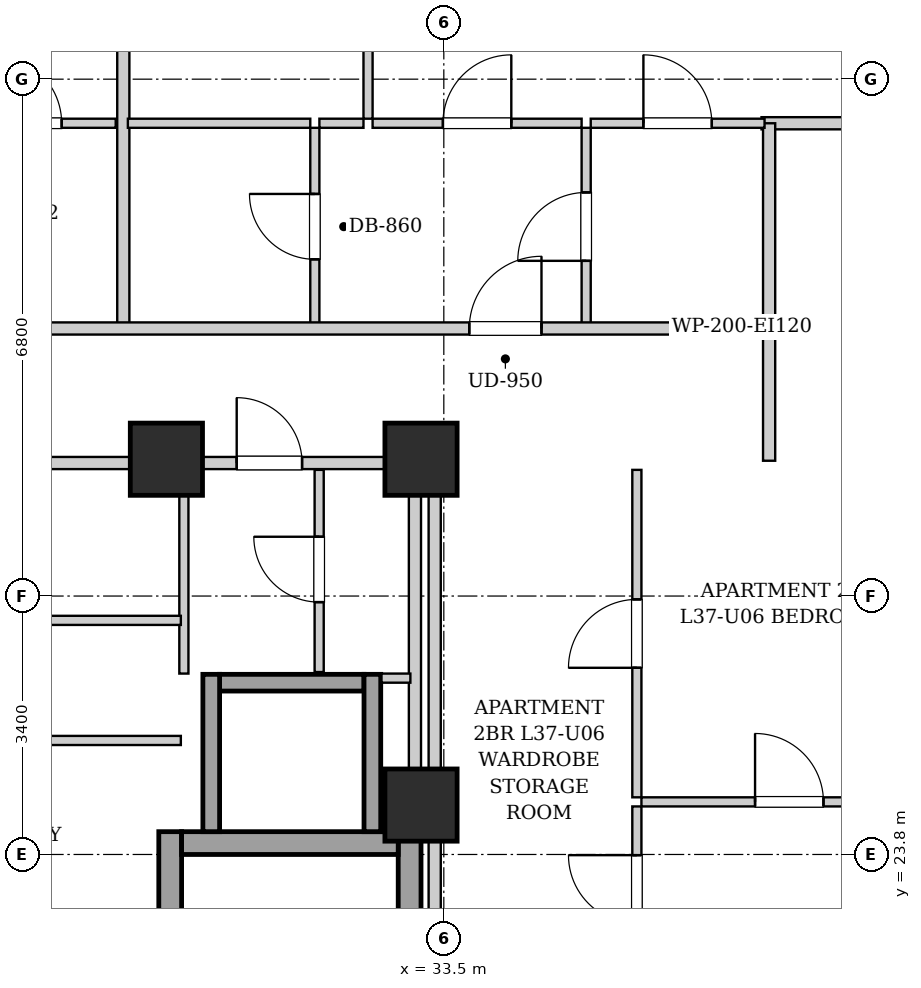
"""IFC4 building model, lengths in metres.
Left out: names, types, materials, properties, quantities, classifications, styles, units other than length and angle.
Written with IfcOpenShell. Run it as: python <this file> out.ifc"""

import sys

from ifc_helpers import new_model, si_unit, direction, frame, frame_2d, origin, origin_2d, place, context, subcontext, project, spatial, rectangle, extrude, element, fill, save


model = new_model("IFC4")
c1 = context("Model", 3, precision=1e-05, world=origin(), true_north=direction((0.0, 1.0)))
c2 = subcontext(c1, "Body", "Model", "MODEL_VIEW")
j1 = project(units=[si_unit("LENGTHUNIT", "METRE"), si_unit("PLANEANGLEUNIT", "RADIAN")], contexts=[c1])
p1 = place(None, origin())
s1 = spatial("IfcSite", under=j1, at=p1, CompositionType="ELEMENT")
p2 = place(p1, origin())
s2 = spatial("IfcBuilding", under=s1, at=p2, CompositionType="ELEMENT")
p3 = place(p2, frame((0.0, 0.0, 130.9)))
s3 = spatial("IfcBuildingStorey", under=s2, at=p3, CompositionType="ELEMENT", Elevation=130.9)
for number, where, z_axis, x_axis in (
    (1, (29.85, 29.0, 0.0), (0.0, 0.0, 1.0), (1.0, 0.0, 0.0)),
    (2, (33.2, 29.0, 0.0), (0.0, 0.0, 1.0), (1.0, 0.0, 0.0)),
    (3, (33.2, 24.45, 0.0), (0.0, 0.0, 1.0), (1.0, 0.0, 0.0)),
):
    element("IfcColumn", number, at=place(p3, frame(where, z_axis=z_axis, x_axis=x_axis)), inside=s3, PredefinedType="COLUMN", context=c2, shape_type="SweptSolid", body=[
        extrude(rectangle(XDim=0.95, YDim=0.95, at=origin_2d()), origin(), (0.0, 0.0, 1.0), 3.25),
    ])
for number, where, z_axis, x_axis in (
    (4, (29.9, 15.1, 0.0), (0.0, 0.0, 1.0), (0.0, 1.0, 0.0)),
    (5, (33.05, 15.1, 0.0), (0.0, 0.0, 1.0), (0.0, 1.0, 0.0)),
):
    element("IfcWall", number, at=place(p3, frame(where, z_axis=z_axis, x_axis=x_axis)), inside=s3, PredefinedType="SHEAR", context=c2, shape_type="SweptSolid", body=[
        extrude(rectangle(XDim=9.0, YDim=0.3, at=frame_2d((4.5, 0.0))), origin(), (0.0, 0.0, 1.0), 2.99),
    ])
p4 = place(p3, frame((30.05, 23.95, 0.0), z_axis=(0.0, 0.0, 1.0), x_axis=(1.0, 0.0, 0.0)))
e6 = element("IfcWall", 6, at=p4, inside=s3, PredefinedType="SHEAR", context=c2, shape_type="SweptSolid", body=[
    extrude(rectangle(XDim=2.85, YDim=0.3, at=frame_2d((1.425, 0.0))), origin(), (0.0, 0.0, 1.0), 2.99),
])
p5 = place(p3, frame((30.55, 26.06, 0.0), z_axis=(0.0, 0.0, 1.0), x_axis=(1.0, 0.0, 0.0)))
e7 = element("IfcWall", 7, at=p5, inside=s3, PredefinedType="SHEAR", context=c2, shape_type="SweptSolid", body=[
    extrude(rectangle(XDim=1.9, YDim=0.22, at=frame_2d((0.95, 0.0))), origin(), (0.0, 0.0, 1.0), 2.99),
])
for number, where, z_axis, x_axis in (
    (8, (30.44, 24.1, 0.0), (0.0, 0.0, 1.0), (0.0, 1.0, 0.0)),
    (9, (32.56, 24.1, 0.0), (0.0, 0.0, 1.0), (0.0, 1.0, 0.0)),
):
    element("IfcWall", number, at=place(p3, frame(where, z_axis=z_axis, x_axis=x_axis)), inside=s3, PredefinedType="SHEAR", context=c2, shape_type="SweptSolid", body=[
        extrude(rectangle(XDim=2.07, YDim=0.22, at=frame_2d((1.035, 0.0))), origin(), (0.0, 0.0, 1.0), 2.99),
    ])
p6 = place(p3, frame((33.12, 24.12, 0.0), z_axis=(0.0, 0.0, 1.0), x_axis=(0.0, 1.0, 0.0)))
e10 = element("IfcWall", 10, at=p6, inside=s3, PredefinedType="PARTITIONING", context=c2, shape_type="SweptSolid", body=[
    extrude(rectangle(XDim=4.76, YDim=0.16, at=frame_2d((2.38, 0.0))), origin(), (0.0, 0.0, 1.0), 2.99),
])
p7 = place(p3, frame((30.08, 26.18, 0.0), z_axis=(0.0, 0.0, 1.0), x_axis=(0.0, 1.0, 0.0)))
e11 = element("IfcWall", 11, at=p7, inside=s3, PredefinedType="PARTITIONING", context=c2, shape_type="SweptSolid", body=[
    extrude(rectangle(XDim=2.68, YDim=0.12, at=frame_2d((1.34, 0.0))), origin(), (0.0, 0.0, 1.0), 2.99),
])
p8 = place(p3, frame((32.68, 26.12, 0.0), z_axis=(0.0, 0.0, 1.0), x_axis=(1.0, 0.0, 0.0)))
e12 = element("IfcWall", 12, at=p8, inside=s3, PredefinedType="PARTITIONING", context=c2, shape_type="SweptSolid", body=[
    extrude(rectangle(XDim=0.38, YDim=0.12, at=frame_2d((0.19, 0.0))), origin(), (0.0, 0.0, 1.0), 2.99),
])
p9 = place(p3, frame((31.86, 26.2, 0.0), z_axis=(0.0, 0.0, 1.0), x_axis=(0.0, 1.0, 0.0)))
e13 = element("IfcWall", 13, at=p9, inside=s3, PredefinedType="PARTITIONING", context=c2, shape_type="SweptSolid", body=[
    extrude(rectangle(XDim=2.66, YDim=0.12, at=frame_2d((1.33, 0.0))), origin(), (0.0, 0.0, 1.0), 2.99),
])
p10 = place(p9, frame((0.92, 0.0, 0.0)))
e14 = element("IfcOpeningElement", 14, at=p10, cuts=e13, PredefinedType="OPENING", context=c2, shape_type="SweptSolid", body=[
    extrude(rectangle(XDim=0.86, YDim=2.05, at=frame_2d((0.43, 1.025))), frame((0.0, 0.07, 0.0), z_axis=(0.0, -1.0, 0.0), x_axis=(1.0, 0.0, 0.0)), (0.0, 0.0, 1.0), 0.14),
])
p11 = place(p3, frame((30.08, 28.95, 0.0), z_axis=(0.0, 0.0, 1.0), x_axis=(1.0, 0.0, 0.0)))
e15 = element("IfcWall", 15, at=p11, inside=s3, PredefinedType="PARTITIONING", context=c2, shape_type="SweptSolid", body=[
    extrude(rectangle(XDim=2.96, YDim=0.16, at=frame_2d((1.48, 0.0))), origin(), (0.0, 0.0, 1.0), 2.99),
])
p12 = place(p11, frame((0.695, 0.0, 0.0)))
e16 = element("IfcOpeningElement", 16, at=p12, cuts=e15, PredefinedType="OPENING", context=c2, shape_type="SweptSolid", body=[
    extrude(rectangle(XDim=0.86, YDim=2.05, at=frame_2d((0.43, 1.025))), frame((0.0, 0.09, 0.0), z_axis=(0.0, -1.0, 0.0), x_axis=(1.0, 0.0, 0.0)), (0.0, 0.0, 1.0), 0.18),
])
p13 = place(p3, frame((25.72, 26.88, 0.0), z_axis=(0.0, 0.0, 1.0), x_axis=(1.0, 0.0, 0.0)))
e17 = element("IfcWall", 17, at=p13, inside=s3, PredefinedType="PARTITIONING", context=c2, shape_type="SweptSolid", body=[
    extrude(rectangle(XDim=4.32, YDim=0.12, at=frame_2d((2.16, 0.0))), origin(), (0.0, 0.0, 1.0), 2.99),
])
p14 = place(p3, frame((25.72, 25.3, 0.0), z_axis=(0.0, 0.0, 1.0), x_axis=(1.0, 0.0, 0.0)))
e18 = element("IfcWall", 18, at=p14, inside=s3, PredefinedType="PARTITIONING", context=c2, shape_type="SweptSolid", body=[
    extrude(rectangle(XDim=4.32, YDim=0.12, at=frame_2d((2.16, 0.0))), origin(), (0.0, 0.0, 1.0), 2.99),
])
p15 = place(p14, frame((1.65, 0.0, 0.0)))
e19 = element("IfcOpeningElement", 19, at=p15, cuts=e18, PredefinedType="OPENING", context=c2, shape_type="SweptSolid", body=[
    extrude(rectangle(XDim=0.9, YDim=2.05, at=frame_2d((0.45, 1.025))), frame((0.0, 0.07, 0.0), z_axis=(0.0, -1.0, 0.0), x_axis=(1.0, 0.0, 0.0)), (0.0, 0.0, 1.0), 0.14),
])
p16 = place(p3, frame((25.72, 28.95, 0.0), z_axis=(0.0, 0.0, 1.0), x_axis=(1.0, 0.0, 0.0)))
e20 = element("IfcWall", 20, at=p16, inside=s3, PredefinedType="PARTITIONING", context=c2, shape_type="SweptSolid", body=[
    extrude(rectangle(XDim=4.32, YDim=0.16, at=frame_2d((2.16, 0.0))), origin(), (0.0, 0.0, 1.0), 2.426),
])
p17 = place(p16, frame((1.27, 0.0, 0.0)))
e21 = element("IfcOpeningElement", 21, at=p17, cuts=e20, PredefinedType="OPENING", context=c2, shape_type="SweptSolid", body=[
    extrude(rectangle(XDim=0.86, YDim=2.05, at=frame_2d((0.43, 1.025))), frame((0.0, 0.09, 0.0), z_axis=(0.0, -1.0, 0.0), x_axis=(1.0, 0.0, 0.0)), (0.0, 0.0, 1.0), 0.18),
])
p18 = place(p3, frame((37.78, 28.98, 0.0), z_axis=(0.0, 0.0, 1.0), x_axis=(0.0, 1.0, 0.0)))
e22 = element("IfcWall", 22, at=p18, inside=s3, PredefinedType="PARTITIONING", context=c2, shape_type="SweptSolid", body=[
    extrude(rectangle(XDim=1.74, YDim=0.16, at=frame_2d((0.87, 0.0))), origin(), (0.0, 0.0, 1.0), 2.99),
])
p19 = place(p3, frame((26.86, 33.42, 0.0), z_axis=(0.0, 0.0, 1.0), x_axis=(1.0, 0.0, 0.0)))
e23 = element("IfcWall", 23, at=p19, inside=s3, PredefinedType="PARTITIONING", context=c2, shape_type="SweptSolid", body=[
    extrude(rectangle(XDim=2.323, YDim=0.12, at=frame_2d((1.162, 0.0))), origin(), (0.0, 0.0, 1.0), 2.99),
])
p20 = place(p19, frame((0.712, 0.0, 0.0)))
e24 = element("IfcOpeningElement", 24, at=p20, cuts=e23, PredefinedType="OPENING", context=c2, shape_type="SweptSolid", body=[
    extrude(rectangle(XDim=0.9, YDim=2.05, at=frame_2d((0.45, 1.025))), frame((0.0, 0.07, 0.0), z_axis=(0.0, -1.0, 0.0), x_axis=(1.0, 0.0, 0.0)), (0.0, 0.0, 1.0), 0.14),
])
p21 = place(p3, frame((37.68, 33.42, 0.0), z_axis=(0.0, 0.0, 1.0), x_axis=(1.0, 0.0, 0.0)))
e25 = element("IfcWall", 25, at=p21, inside=s3, PredefinedType="PARTITIONING", context=c2, shape_type="SweptSolid", body=[
    extrude(rectangle(XDim=2.34, YDim=0.16, at=frame_2d((1.17, 0.0))), origin(), (0.0, 0.0, 1.0), 2.99),
])
p22 = place(p3, frame((37.78, 30.76, 0.0), z_axis=(0.0, 0.0, 1.0), x_axis=(0.0, 1.0, 0.0)))
e26 = element("IfcWall", 26, at=p22, inside=s3, PredefinedType="PARTITIONING", context=c2, shape_type="SweptSolid", body=[
    extrude(rectangle(XDim=2.66, YDim=0.16, at=frame_2d((1.33, 0.0))), origin(), (0.0, 0.0, 1.0), 2.99),
])
p23 = place(p3, frame((29.283, 30.76, 0.0), z_axis=(0.0, 0.0, 1.0), x_axis=(0.0, 1.0, 0.0)))
e27 = element("IfcWall", 27, at=p23, inside=s3, PredefinedType="PARTITIONING", context=c2, shape_type="SweptSolid", body=[
    extrude(rectangle(XDim=12.26, YDim=0.16, at=frame_2d((6.13, 0.0))), origin(), (0.0, 0.0, 1.0), 2.99),
])
p24 = place(p3, frame((31.803, 30.76, 0.0), z_axis=(0.0, 0.0, 1.0), x_axis=(0.0, 1.0, 0.0)))
e28 = element("IfcWall", 28, at=p24, inside=s3, PredefinedType="PARTITIONING", context=c2, shape_type="SweptSolid", body=[
    extrude(rectangle(XDim=2.6, YDim=0.12, at=frame_2d((1.3, 0.0))), origin(), (0.0, 0.0, 1.0), 2.99),
])
p25 = place(p24, frame((0.87, 0.0, 0.0)))
e29 = element("IfcOpeningElement", 29, at=p25, cuts=e28, PredefinedType="OPENING", context=c2, shape_type="SweptSolid", body=[
    extrude(rectangle(XDim=0.86, YDim=2.05, at=frame_2d((0.43, 1.025))), frame((0.0, 0.07, 0.0), z_axis=(0.0, -1.0, 0.0), x_axis=(1.0, 0.0, 0.0)), (0.0, 0.0, 1.0), 0.14),
])
p26 = place(p3, frame((29.343, 33.42, 0.0), z_axis=(0.0, 0.0, 1.0), x_axis=(1.0, 0.0, 0.0)))
e30 = element("IfcWall", 30, at=p26, inside=s3, PredefinedType="PARTITIONING", context=c2, shape_type="SweptSolid", body=[
    extrude(rectangle(XDim=2.4, YDim=0.12, at=frame_2d((1.2, 0.0))), origin(), (0.0, 0.0, 1.0), 2.99),
])
p27 = place(p3, frame((35.373, 30.76, 0.0), z_axis=(0.0, 0.0, 1.0), x_axis=(0.0, 1.0, 0.0)))
e31 = element("IfcWall", 31, at=p27, inside=s3, PredefinedType="PARTITIONING", context=c2, shape_type="SweptSolid", body=[
    extrude(rectangle(XDim=2.6, YDim=0.12, at=frame_2d((1.3, 0.0))), origin(), (0.0, 0.0, 1.0), 2.99),
])
p28 = place(p27, frame((0.85, 0.0, 0.0)))
e32 = element("IfcOpeningElement", 32, at=p28, cuts=e31, PredefinedType="OPENING", context=c2, shape_type="SweptSolid", body=[
    extrude(rectangle(XDim=0.9, YDim=2.05, at=frame_2d((0.45, 1.025))), frame((0.0, 0.07, 0.0), z_axis=(0.0, -1.0, 0.0), x_axis=(1.0, 0.0, 0.0)), (0.0, 0.0, 1.0), 0.14),
])
p29 = place(p3, frame((31.863, 33.42, 0.0), z_axis=(0.0, 0.0, 1.0), x_axis=(1.0, 0.0, 0.0)))
e33 = element("IfcWall", 33, at=p29, inside=s3, PredefinedType="PARTITIONING", context=c2, shape_type="SweptSolid", body=[
    extrude(rectangle(XDim=0.58, YDim=0.12, at=frame_2d((0.29, 0.0))), origin(), (0.0, 0.0, 1.0), 2.99),
])
p30 = place(p3, frame((32.563, 33.42, 0.0), z_axis=(0.0, 0.0, 1.0), x_axis=(1.0, 0.0, 0.0)))
e34 = element("IfcWall", 34, at=p30, inside=s3, PredefinedType="PARTITIONING", context=c2, shape_type="SweptSolid", body=[
    extrude(rectangle(XDim=2.75, YDim=0.12, at=frame_2d((1.375, 0.0))), origin(), (0.0, 0.0, 1.0), 2.99),
])
p31 = place(p30, frame((0.925, 0.0, 0.0)))
e35 = element("IfcOpeningElement", 35, at=p31, cuts=e34, PredefinedType="OPENING", context=c2, shape_type="SweptSolid", body=[
    extrude(rectangle(XDim=0.9, YDim=2.05, at=frame_2d((0.45, 1.025))), frame((0.0, 0.07, 0.0), z_axis=(0.0, -1.0, 0.0), x_axis=(1.0, 0.0, 0.0)), (0.0, 0.0, 1.0), 0.14),
])
p32 = place(p3, frame((35.433, 33.42, 0.0), z_axis=(0.0, 0.0, 1.0), x_axis=(1.0, 0.0, 0.0)))
e36 = element("IfcWall", 36, at=p32, inside=s3, PredefinedType="PARTITIONING", context=c2, shape_type="SweptSolid", body=[
    extrude(rectangle(XDim=2.287, YDim=0.12, at=frame_2d((1.144, 0.0))), origin(), (0.0, 0.0, 1.0), 2.99),
])
p33 = place(p32, frame((0.693, 0.0, 0.0)))
e37 = element("IfcOpeningElement", 37, at=p33, cuts=e36, PredefinedType="OPENING", context=c2, shape_type="SweptSolid", body=[
    extrude(rectangle(XDim=0.9, YDim=2.05, at=frame_2d((0.45, 1.025))), frame((0.0, 0.07, 0.0), z_axis=(0.0, -1.0, 0.0), x_axis=(1.0, 0.0, 0.0)), (0.0, 0.0, 1.0), 0.14),
])
p34 = place(p3, frame((32.503, 33.48, 0.0), z_axis=(0.0, 0.0, 1.0), x_axis=(0.0, 1.0, 0.0)))
e38 = element("IfcWall", 38, at=p34, inside=s3, PredefinedType="PARTITIONING", context=c2, shape_type="SweptSolid", body=[
    extrude(rectangle(XDim=7.39, YDim=0.12, at=frame_2d((3.695, 0.0))), origin(), (0.0, 0.0, 1.0), 2.99),
])
p35 = place(p34, frame((3.245, 0.0, 0.0)))
e39 = element("IfcOpeningElement", 39, at=p35, cuts=e38, PredefinedType="OPENING", context=c2, shape_type="SweptSolid", body=[
    extrude(rectangle(XDim=0.9, YDim=2.05, at=frame_2d((0.45, 1.025))), frame((0.0, 0.07, 0.0), z_axis=(0.0, -1.0, 0.0), x_axis=(1.0, 0.0, 0.0)), (0.0, 0.0, 1.0), 0.14),
])
p36 = place(p3, frame((36.04, 22.25, 0.0), z_axis=(0.0, 0.0, 1.0), x_axis=(0.0, 1.0, 0.0)))
e40 = element("IfcWall", 40, at=p36, inside=s3, PredefinedType="PARTITIONING", context=c2, shape_type="SweptSolid", body=[
    extrude(rectangle(XDim=2.182, YDim=0.12, at=frame_2d((1.091, 0.0))), origin(), (0.0, 0.0, 1.0), 2.99),
])
p37 = place(p36, frame((0.641, 0.0, 0.0)))
e41 = element("IfcOpeningElement", 41, at=p37, cuts=e40, PredefinedType="OPENING", context=c2, shape_type="SweptSolid", body=[
    extrude(rectangle(XDim=0.9, YDim=2.05, at=frame_2d((0.45, 1.025))), frame((0.0, 0.07, 0.0), z_axis=(0.0, -1.0, 0.0), x_axis=(1.0, 0.0, 0.0)), (0.0, 0.0, 1.0), 0.14),
])
p38 = place(p3, frame((36.04, 24.552, 0.0), z_axis=(0.0, 0.0, 1.0), x_axis=(0.0, 1.0, 0.0)))
e42 = element("IfcWall", 42, at=p38, inside=s3, PredefinedType="PARTITIONING", context=c2, shape_type="SweptSolid", body=[
    extrude(rectangle(XDim=4.308, YDim=0.12, at=frame_2d((2.154, 0.0))), origin(), (0.0, 0.0, 1.0), 2.99),
])
p39 = place(p38, frame((1.704, 0.0, 0.0)))
e43 = element("IfcOpeningElement", 43, at=p39, cuts=e42, PredefinedType="OPENING", context=c2, shape_type="SweptSolid", body=[
    extrude(rectangle(XDim=0.9, YDim=2.05, at=frame_2d((0.45, 1.025))), frame((0.0, 0.07, 0.0), z_axis=(0.0, -1.0, 0.0), x_axis=(1.0, 0.0, 0.0)), (0.0, 0.0, 1.0), 0.14),
])
p40 = place(p3, frame((36.1, 24.492, 0.0), z_axis=(0.0, 0.0, 1.0), x_axis=(1.0, 0.0, 0.0)))
e44 = element("IfcWall", 44, at=p40, inside=s3, PredefinedType="PARTITIONING", context=c2, shape_type="SweptSolid", body=[
    extrude(rectangle(XDim=3.92, YDim=0.12, at=frame_2d((1.96, 0.0))), origin(), (0.0, 0.0, 1.0), 2.621),
])
p41 = place(p40, frame((1.495, 0.0, 0.0)))
e45 = element("IfcOpeningElement", 45, at=p41, cuts=e44, PredefinedType="OPENING", context=c2, shape_type="SweptSolid", body=[
    extrude(rectangle(XDim=0.9, YDim=2.05, at=frame_2d((0.45, 1.025))), frame((0.0, 0.07, 0.0), z_axis=(0.0, -1.0, 0.0), x_axis=(1.0, 0.0, 0.0)), (0.0, 0.0, 1.0), 0.14),
])
p42 = place(p3, frame((10.05, 30.72, 0.0), z_axis=(0.0, 0.0, 1.0), x_axis=(1.0, 0.0, 0.0)))
e46 = element("IfcWall", 46, at=p42, inside=s3, PredefinedType="PARTITIONING", context=c2, shape_type="SweptSolid", body=[
    extrude(rectangle(XDim=27.7, YDim=0.16, at=frame_2d((13.85, 0.0))), origin(), (0.0, 0.0, 1.0), 2.99),
])
p43 = place(p42, frame((4.295, 0.0, 0.0)))
e47 = element("IfcOpeningElement", 47, at=p43, cuts=e46, PredefinedType="OPENING", context=c2, shape_type="SweptSolid", body=[
    extrude(rectangle(XDim=0.95, YDim=2.1, at=frame_2d((0.475, 1.05))), frame((0.0, 0.09, 0.0), z_axis=(0.0, -1.0, 0.0), x_axis=(1.0, 0.0, 0.0)), (0.0, 0.0, 1.0), 0.18),
])
p44 = place(p42, frame((23.785, 0.0, 0.0)))
e48 = element("IfcOpeningElement", 48, at=p44, cuts=e46, PredefinedType="OPENING", context=c2, shape_type="SweptSolid", body=[
    extrude(rectangle(XDim=0.95, YDim=2.1, at=frame_2d((0.475, 1.05))), frame((0.0, 0.09, 0.0), z_axis=(0.0, -1.0, 0.0), x_axis=(1.0, 0.0, 0.0)), (0.0, 0.0, 1.0), 0.18),
])
p45 = place(p3, frame((33.38, 15.02, 0.0), z_axis=(0.0, 0.0, 1.0), x_axis=(0.0, 1.0, 0.0)))
e49 = element("IfcWall", 49, at=p45, inside=s3, PredefinedType="PARTITIONING", context=c2, shape_type="SweptSolid", body=[
    extrude(rectangle(XDim=13.98, YDim=0.16, at=frame_2d((6.99, 0.0))), origin(), (0.0, 0.0, 1.0), 2.99),
])
p46 = place(p10, origin())
e50 = element("IfcDoor", 50, at=p46, inside=s3, OperationType="SINGLE_SWING_RIGHT", PredefinedType="DOOR", context=c2, shape_type="SweptSolid", body=[
    extrude(rectangle(XDim=0.86, YDim=2.05, at=frame_2d((0.43, 1.025))), frame((0.0, 0.025, 0.0), z_axis=(0.0, -1.0, 0.0), x_axis=(1.0, 0.0, 0.0)), (0.0, 0.0, 1.0), 0.05),
])
fill(e14, e50)
p47 = place(p12, origin())
e51 = element("IfcDoor", 51, at=p47, inside=s3, OperationType="SINGLE_SWING_LEFT", PredefinedType="DOOR", context=c2, shape_type="SweptSolid", body=[
    extrude(rectangle(XDim=0.86, YDim=2.05, at=frame_2d((0.43, 1.025))), frame((0.0, 0.025, 0.0), z_axis=(0.0, -1.0, 0.0), x_axis=(1.0, 0.0, 0.0)), (0.0, 0.0, 1.0), 0.05),
])
fill(e16, e51)
p48 = place(p20, origin())
e52 = element("IfcDoor", 52, at=p48, inside=s3, OperationType="SINGLE_SWING_LEFT", PredefinedType="DOOR", context=c2, shape_type="SweptSolid", body=[
    extrude(rectangle(XDim=0.9, YDim=2.05, at=frame_2d((0.45, 1.025))), frame((0.0, 0.025, 0.0), z_axis=(0.0, -1.0, 0.0), x_axis=(1.0, 0.0, 0.0)), (0.0, 0.0, 1.0), 0.05),
])
fill(e24, e52)
p49 = place(p25, origin())
e53 = element("IfcDoor", 53, at=p49, inside=s3, OperationType="SINGLE_SWING_RIGHT", PredefinedType="DOOR", context=c2, shape_type="SweptSolid", body=[
    extrude(rectangle(XDim=0.86, YDim=2.05, at=frame_2d((0.43, 1.025))), frame((0.0, 0.025, 0.0), z_axis=(0.0, -1.0, 0.0), x_axis=(1.0, 0.0, 0.0)), (0.0, 0.0, 1.0), 0.05),
])
fill(e29, e53)
p50 = place(p28, origin())
e54 = element("IfcDoor", 54, at=p50, inside=s3, OperationType="SINGLE_SWING_LEFT", PredefinedType="DOOR", context=c2, shape_type="SweptSolid", body=[
    extrude(rectangle(XDim=0.9, YDim=2.05, at=frame_2d((0.45, 1.025))), frame((0.0, 0.025, 0.0), z_axis=(0.0, -1.0, 0.0), x_axis=(1.0, 0.0, 0.0)), (0.0, 0.0, 1.0), 0.05),
])
fill(e32, e54)
p51 = place(p31, origin())
e55 = element("IfcDoor", 55, at=p51, inside=s3, OperationType="SINGLE_SWING_RIGHT", PredefinedType="DOOR", context=c2, shape_type="SweptSolid", body=[
    extrude(rectangle(XDim=0.9, YDim=2.05, at=frame_2d((0.45, 1.025))), frame((0.0, 0.025, 0.0), z_axis=(0.0, -1.0, 0.0), x_axis=(1.0, 0.0, 0.0)), (0.0, 0.0, 1.0), 0.05),
])
fill(e35, e55)
p52 = place(p33, origin())
e56 = element("IfcDoor", 56, at=p52, inside=s3, OperationType="SINGLE_SWING_LEFT", PredefinedType="DOOR", context=c2, shape_type="SweptSolid", body=[
    extrude(rectangle(XDim=0.9, YDim=2.05, at=frame_2d((0.45, 1.025))), frame((0.0, 0.025, 0.0), z_axis=(0.0, -1.0, 0.0), x_axis=(1.0, 0.0, 0.0)), (0.0, 0.0, 1.0), 0.05),
])
fill(e37, e56)
p53 = place(p37, origin())
e57 = element("IfcDoor", 57, at=p53, inside=s3, OperationType="SINGLE_SWING_RIGHT", PredefinedType="DOOR", context=c2, shape_type="SweptSolid", body=[
    extrude(rectangle(XDim=0.9, YDim=2.05, at=frame_2d((0.45, 1.025))), frame((0.0, 0.025, 0.0), z_axis=(0.0, -1.0, 0.0), x_axis=(1.0, 0.0, 0.0)), (0.0, 0.0, 1.0), 0.05),
])
fill(e41, e57)
p54 = place(p39, origin())
e58 = element("IfcDoor", 58, at=p54, inside=s3, OperationType="SINGLE_SWING_LEFT", PredefinedType="DOOR", context=c2, shape_type="SweptSolid", body=[
    extrude(rectangle(XDim=0.9, YDim=2.05, at=frame_2d((0.45, 1.025))), frame((0.0, 0.025, 0.0), z_axis=(0.0, -1.0, 0.0), x_axis=(1.0, 0.0, 0.0)), (0.0, 0.0, 1.0), 0.05),
])
fill(e43, e58)
p55 = place(p41, origin())
e59 = element("IfcDoor", 59, at=p55, inside=s3, OperationType="SINGLE_SWING_LEFT", PredefinedType="DOOR", context=c2, shape_type="SweptSolid", body=[
    extrude(rectangle(XDim=0.9, YDim=2.05, at=frame_2d((0.45, 1.025))), frame((0.0, 0.025, 0.0), z_axis=(0.0, -1.0, 0.0), x_axis=(1.0, 0.0, 0.0)), (0.0, 0.0, 1.0), 0.05),
])
fill(e45, e59)
p56 = place(p44, origin())
e60 = element("IfcDoor", 60, at=p56, inside=s3, OperationType="SINGLE_SWING_RIGHT", PredefinedType="DOOR", context=c2, shape_type="SweptSolid", body=[
    extrude(rectangle(XDim=0.95, YDim=2.1, at=frame_2d((0.475, 1.05))), frame((0.0, 0.025, 0.0), z_axis=(0.0, -1.0, 0.0), x_axis=(1.0, 0.0, 0.0)), (0.0, 0.0, 1.0), 0.05),
])
fill(e48, e60)
save(model, sys.argv[1])
